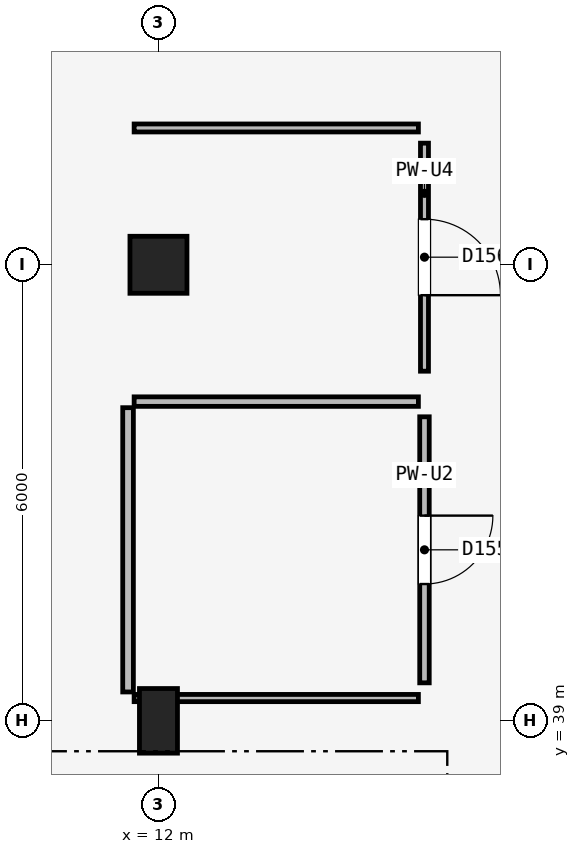
"""IFC4 building model, lengths in metres.
Left out: names, types, materials, properties, quantities, classifications, styles, units other than length and angle.
Written with IfcOpenShell. Run it as: python <this file> out.ifc"""

import sys

from ifc_helpers import new_model, si_unit, direction, frame, frame_2d, origin, origin_2d, place, context, subcontext, project, spatial, rectangle, extrude, element, fill, save


model = new_model("IFC4")
c1 = context("Model", 3, precision=1e-05, world=origin(), true_north=direction((0.0, 1.0)))
c2 = subcontext(c1, "Body", "Model", "MODEL_VIEW")
j1 = project(units=[si_unit("LENGTHUNIT", "METRE"), si_unit("PLANEANGLEUNIT", "RADIAN")], contexts=[c1])
p1 = place(None, origin())
s1 = spatial("IfcSite", under=j1, at=p1, CompositionType="ELEMENT")
p2 = place(p1, origin())
s2 = spatial("IfcBuilding", under=s1, at=p2, CompositionType="ELEMENT")
p3 = place(p2, origin())
s3 = spatial("IfcBuildingStorey", under=s2, at=p3, CompositionType="ELEMENT", Elevation=0.0)
p4 = place(p3, frame((12.0, 39.0, 0.0), z_axis=(0.0, 0.0, 1.0), x_axis=(1.0, 0.0, 0.0)))
e1 = element("IfcColumn", 1, at=p4, inside=s3, PredefinedType="COLUMN", context=c2, shape_type="SweptSolid", body=[
    extrude(rectangle(XDim=0.5, YDim=0.85, at=origin_2d()), origin(), (0.0, 0.0, 1.0), 4.8),
])
p5 = place(p3, frame((12.0, 45.0, 0.0), z_axis=(0.0, 0.0, 1.0), x_axis=(1.0, 0.0, 0.0)))
e2 = element("IfcColumn", 2, at=p5, inside=s3, PredefinedType="COLUMN", context=c2, shape_type="SweptSolid", body=[
    extrude(rectangle(XDim=0.75, YDim=0.75, at=origin_2d()), origin(), (0.0, 0.0, 1.0), 4.8),
])
p6 = place(p3, frame((15.5, 43.0, 0.0), z_axis=(0.0, 0.0, 1.0), x_axis=(0.0, -1.0, 0.0)))
e3 = element("IfcWall", 3, at=p6, inside=s3, PredefinedType="PARTITIONING", context=c2, shape_type="SweptSolid", body=[
    extrude(rectangle(XDim=3.5, YDim=0.125, at=frame_2d((1.75, 0.0))), origin(), (0.0, 0.0, 1.0), 4.49),
])
p7 = place(p6, frame((1.3, 0.0, 0.0)))
e4 = element("IfcOpeningElement", 4, at=p7, cuts=e3, PredefinedType="OPENING", context=c2, shape_type="SweptSolid", body=[
    extrude(rectangle(XDim=0.9, YDim=2.1, at=frame_2d((0.45, 1.05))), frame((0.0, 0.073, 0.0), z_axis=(0.0, -1.0, 0.0), x_axis=(1.0, 0.0, 0.0)), (0.0, 0.0, 1.0), 0.145),
])
p8 = place(p3, frame((15.5, 46.6, 0.0), z_axis=(0.0, 0.0, 1.0), x_axis=(0.0, -1.0, 0.0)))
e5 = element("IfcWall", 5, at=p8, inside=s3, PredefinedType="PARTITIONING", context=c2, shape_type="SweptSolid", body=[
    extrude(rectangle(XDim=3.0, YDim=0.105, at=frame_2d((1.5, 0.0))), origin(), (0.0, 0.0, 1.0), 3.94),
])
p9 = place(p8, frame((1.0, 0.0, 0.0)))
e6 = element("IfcOpeningElement", 6, at=p9, cuts=e5, PredefinedType="OPENING", context=c2, shape_type="SweptSolid", body=[
    extrude(rectangle(XDim=1.0, YDim=2.1, at=frame_2d((0.5, 1.05))), frame((0.0, 0.062, 0.0), z_axis=(0.0, -1.0, 0.0), x_axis=(1.0, 0.0, 0.0)), (0.0, 0.0, 1.0), 0.125),
])
p10 = place(p3, frame((15.42, 39.3, 0.0), z_axis=(0.0, 0.0, 1.0), x_axis=(-1.0, 0.0, 0.0)))
e7 = element("IfcWall", 7, at=p10, inside=s3, PredefinedType="PARTITIONING", context=c2, shape_type="SweptSolid", body=[
    extrude(rectangle(XDim=3.74, YDim=0.095, at=frame_2d((1.87, 0.0))), origin(), (0.0, 0.0, 1.0), 4.09),
])
p11 = place(p3, frame((11.6, 39.38, 0.0), z_axis=(0.0, 0.0, 1.0), x_axis=(0.0, 1.0, 0.0)))
e8 = element("IfcWall", 8, at=p11, inside=s3, PredefinedType="PARTITIONING", context=c2, shape_type="SweptSolid", body=[
    extrude(rectangle(XDim=3.74, YDim=0.14, at=frame_2d((1.87, 0.0))), origin(), (0.0, 0.0, 1.0), 4.49),
])
p12 = place(p3, frame((11.68, 43.2, 0.0), z_axis=(0.0, 0.0, 1.0), x_axis=(1.0, 0.0, 0.0)))
e9 = element("IfcWall", 9, at=p12, inside=s3, PredefinedType="PARTITIONING", context=c2, shape_type="SweptSolid", body=[
    extrude(rectangle(XDim=3.74, YDim=0.125, at=frame_2d((1.87, 0.0))), origin(), (0.0, 0.0, 1.0), 4.09),
])
p13 = place(p3, frame((11.68, 46.8, 0.0), z_axis=(0.0, 0.0, 1.0), x_axis=(1.0, 0.0, 0.0)))
e10 = element("IfcWall", 10, at=p13, inside=s3, PredefinedType="PARTITIONING", context=c2, shape_type="SweptSolid", body=[
    extrude(rectangle(XDim=3.74, YDim=0.105, at=frame_2d((1.87, 0.0))), origin(), (0.0, 0.0, 1.0), 4.083),
])
p14 = place(p7, origin())
e11 = element("IfcDoor", 11, at=p14, inside=s3, OperationType="SINGLE_SWING_LEFT", PredefinedType="DOOR", context=c2, shape_type="SweptSolid", body=[
    extrude(rectangle(XDim=0.9, YDim=2.1, at=frame_2d((0.45, 1.05))), frame((0.0, 0.025, 0.0), z_axis=(0.0, -1.0, 0.0), x_axis=(1.0, 0.0, 0.0)), (0.0, 0.0, 1.0), 0.05),
])
fill(e4, e11)
p15 = place(p9, origin())
e12 = element("IfcDoor", 12, at=p15, inside=s3, OperationType="SINGLE_SWING_RIGHT", PredefinedType="DOOR", context=c2, shape_type="SweptSolid", body=[
    extrude(rectangle(XDim=1.0, YDim=2.1, at=frame_2d((0.5, 1.05))), frame((0.0, 0.025, 0.0), z_axis=(0.0, -1.0, 0.0), x_axis=(1.0, 0.0, 0.0)), (0.0, 0.0, 1.0), 0.05),
])
fill(e6, e12)
save(model, sys.argv[1])
